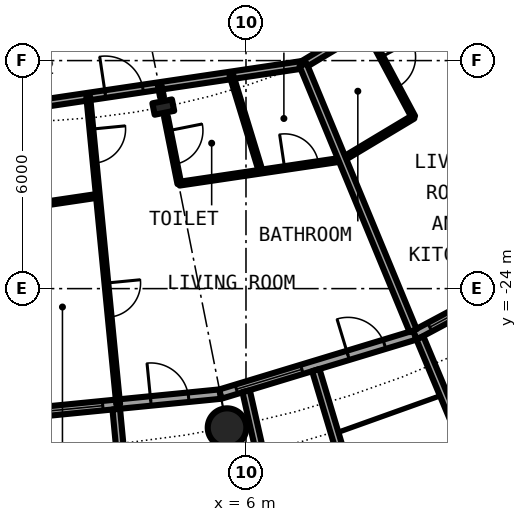
"""IFC4 building model, lengths in metres.
Left out: names, types, materials, properties, quantities, classifications, styles, units other than length and angle.
Written with IfcOpenShell. Run it as: python <this file> out.ifc"""

import sys

from ifc_helpers import new_model, si_unit, direction, frame, frame_2d, origin, origin_2d, place, context, subcontext, project, spatial, rectangle, hollow_circle, i_section, extrude, element, fill, save


model = new_model("IFC4")
c1 = context("Model", 3, precision=1e-05, world=origin(), true_north=direction((0.0, 1.0)))
c2 = subcontext(c1, "Body", "Model", "MODEL_VIEW")
j1 = project(units=[si_unit("LENGTHUNIT", "METRE"), si_unit("PLANEANGLEUNIT", "RADIAN")], contexts=[c1])
p1 = place(None, origin())
s1 = spatial("IfcSite", under=j1, at=p1, CompositionType="ELEMENT")
p2 = place(p1, origin())
s2 = spatial("IfcBuilding", under=s1, at=p2, CompositionType="ELEMENT")
p3 = place(p2, frame((0.0, 0.0, 75.8)))
s3 = spatial("IfcBuildingStorey", under=s2, at=p3, CompositionType="ELEMENT", Elevation=75.8)
p4 = place(p3, frame((5.501, -27.658, 0.0), z_axis=(0.0, 0.0, 1.0), x_axis=(1.0, 0.0, 0.0)))
e1 = element("IfcColumn", 1, at=p4, inside=s3, PredefinedType="COLUMN", context=c2, shape_type="SweptSolid", body=[
    extrude(hollow_circle(Radius=0.508, WallThickness=0.04, at=origin_2d()), origin(), (0.0, 0.0, 1.0), 3.05),
])
p5 = place(p3, frame((3.824, -19.223, 0.0), z_axis=(0.0, 0.0, 1.0), x_axis=(0.195090322016, -0.980785280403, 0.0)))
e2 = element("IfcColumn", 2, at=p5, inside=s3, PredefinedType="COLUMN", context=c2, shape_type="SweptSolid", body=[
    extrude(i_section(OverallWidth=0.306, OverallDepth=0.524, WebThickness=0.021, FlangeThickness=0.04, FilletRadius=0.027, at=origin_2d()), origin(), (0.0, 0.0, 1.0), 3.05),
])
p6 = place(p3, frame((0.0, -27.3, 0.0), z_axis=(0.0, 0.0, 1.0), x_axis=(0.995173996315, 0.098126026407, 0.0)))
e3 = element("IfcWall", 3, at=p6, inside=s3, PredefinedType="SOLIDWALL", context=c2, shape_type="SweptSolid", body=[
    extrude(rectangle(XDim=5.352, YDim=0.25, at=frame_2d((2.676, 0.0))), origin(), (0.0, 0.0, 1.0), 2.7),
])
p7 = place(p6, frame((0.441, 0.0, 0.3)))
e4 = element("IfcOpeningElement", 4, at=p7, cuts=e3, PredefinedType="OPENING", context=c2, shape_type="SweptSolid", body=[
    extrude(rectangle(XDim=1.8, YDim=2.1, at=frame_2d((0.9, 1.05))), frame((0.0, 0.135, 0.0), z_axis=(0.0, -1.0, 0.0), x_axis=(1.0, 0.0, 0.0)), (0.0, 0.0, 1.0), 0.27),
])
p8 = place(p6, frame((3.51, 0.0, 0.0)))
e5 = element("IfcOpeningElement", 5, at=p8, cuts=e3, PredefinedType="OPENING", context=c2, shape_type="SweptSolid", body=[
    extrude(rectangle(XDim=1.0, YDim=2.2, at=frame_2d((0.5, 1.1))), frame((0.0, 0.135, 0.0), z_axis=(0.0, -1.0, 0.0), x_axis=(1.0, 0.0, 0.0)), (0.0, 0.0, 1.0), 0.27),
])
p9 = place(p3, frame((2.586, -27.171, -0.03), z_axis=(0.0, 0.0, 1.0), x_axis=(0.094548432284, -0.995520262954, 0.0)))
e6 = element("IfcWall", 6, at=p9, inside=s3, PredefinedType="SOLIDWALL", context=c2, shape_type="SweptSolid", body=[
    extrude(rectangle(XDim=3.006, YDim=0.2, at=frame_2d((1.503, 0.0))), origin(), (0.0, 0.0, 1.0), 2.73),
])
p10 = place(p3, frame((5.326, -26.775, 0.0), z_axis=(0.0, 0.0, 1.0), x_axis=(0.956965678721, 0.290201119486, 0.0)))
e7 = element("IfcWall", 7, at=p10, inside=s3, PredefinedType="SOLIDWALL", context=c2, shape_type="SweptSolid", body=[
    extrude(rectangle(XDim=5.351, YDim=0.25, at=frame_2d((2.676, 0.0))), origin(), (0.0, 0.0, 1.0), 2.7),
])
p11 = place(p10, frame((0.441, 0.0, 0.3)))
e8 = element("IfcOpeningElement", 8, at=p11, cuts=e7, PredefinedType="OPENING", context=c2, shape_type="SweptSolid", body=[
    extrude(rectangle(XDim=1.8, YDim=2.1, at=frame_2d((0.9, 1.05))), frame((0.0, 0.135, 0.0), z_axis=(0.0, -1.0, 0.0), x_axis=(1.0, 0.0, 0.0)), (0.0, 0.0, 1.0), 0.27),
])
p12 = place(p10, frame((3.51, 0.0, 0.0)))
e9 = element("IfcOpeningElement", 9, at=p12, cuts=e7, PredefinedType="OPENING", context=c2, shape_type="SweptSolid", body=[
    extrude(rectangle(XDim=1.0, YDim=2.2, at=frame_2d((0.5, 1.1))), frame((0.0, 0.135, 0.0), z_axis=(0.0, -1.0, 0.0), x_axis=(1.0, 0.0, 0.0)), (0.0, 0.0, 1.0), 0.27),
])
p13 = place(p3, frame((6.004, -26.7, -0.03), z_axis=(0.0, 0.0, 1.0), x_axis=(0.219609259383, -0.975587911566, 0.0)))
e10 = element("IfcWall", 10, at=p13, inside=s3, PredefinedType="SOLIDWALL", context=c2, shape_type="SweptSolid", body=[
    extrude(rectangle(XDim=2.933, YDim=0.2, at=frame_2d((1.466, 0.0))), origin(), (0.0, 0.0, 1.0), 2.73),
])
p14 = place(p3, frame((7.837, -26.144, -0.03), z_axis=(0.0, 0.0, 1.0), x_axis=(0.287064767992, -0.957911174889, 0.0)))
e11 = element("IfcWall", 11, at=p14, inside=s3, PredefinedType="SOLIDWALL", context=c2, shape_type="SweptSolid", body=[
    extrude(rectangle(XDim=3.006, YDim=0.2, at=frame_2d((1.503, 0.0))), origin(), (0.0, 0.0, 1.0), 2.73),
])
p15 = place(p3, frame((10.447, -25.222, 0.0), z_axis=(0.0, 0.0, 1.0), x_axis=(0.881915646801, 0.471407246368, 0.0)))
e12 = element("IfcWall", 12, at=p15, inside=s3, PredefinedType="SOLIDWALL", context=c2, shape_type="SweptSolid", body=[
    extrude(rectangle(XDim=5.352, YDim=0.25, at=frame_2d((2.676, 0.0))), origin(), (0.0, 0.0, 1.0), 2.7),
])
p16 = place(p15, frame((0.441, 0.0, 0.3)))
e13 = element("IfcOpeningElement", 13, at=p16, cuts=e12, PredefinedType="OPENING", context=c2, shape_type="SweptSolid", body=[
    extrude(rectangle(XDim=1.8, YDim=2.1, at=frame_2d((0.9, 1.05))), frame((0.0, 0.135, 0.0), z_axis=(0.0, -1.0, 0.0), x_axis=(1.0, 0.0, 0.0)), (0.0, 0.0, 1.0), 0.27),
])
p17 = place(p15, frame((3.51, 0.0, 0.0)))
e14 = element("IfcOpeningElement", 14, at=p17, cuts=e12, PredefinedType="OPENING", context=c2, shape_type="SweptSolid", body=[
    extrude(rectangle(XDim=1.0, YDim=2.2, at=frame_2d((0.5, 1.1))), frame((0.0, 0.135, 0.0), z_axis=(0.0, -1.0, 0.0), x_axis=(1.0, 0.0, 0.0)), (0.0, 0.0, 1.0), 0.27),
])
p18 = place(p3, frame((10.575, -25.295, -0.03), z_axis=(0.0, 0.0, 1.0), x_axis=(0.385697364644, -0.922625353492, 0.0)))
e15 = element("IfcWall", 15, at=p18, inside=s3, PredefinedType="SOLIDWALL", context=c2, shape_type="SweptSolid", body=[
    extrude(rectangle(XDim=2.883, YDim=0.2, at=frame_2d((1.442, 0.0))), origin(), (0.0, 0.0, 1.0), 2.73),
])
p19 = place(p3, frame((8.534, -20.604, 0.0), z_axis=(0.0, 0.0, 1.0), x_axis=(0.857611386679, 0.514298268943, 0.0)))
e16 = element("IfcWall", 16, at=p19, inside=s3, PredefinedType="PARTITIONING", context=c2, shape_type="SweptSolid", body=[
    extrude(rectangle(XDim=2.182, YDim=0.1, at=frame_2d((1.091, 0.0))), origin(), (0.0, 0.0, 1.0), 2.7),
])
p20 = place(p3, frame((-2.186, -22.193, 0.0), z_axis=(0.0, 0.0, 1.0), x_axis=(0.989171386505, 0.146765009863, 0.0)))
e17 = element("IfcWall", 17, at=p20, inside=s3, PredefinedType="PARTITIONING", context=c2, shape_type="SweptSolid", body=[
    extrude(rectangle(XDim=4.335, YDim=0.1, at=frame_2d((2.167, 0.0))), origin(), (0.0, 0.0, 1.0), 2.7),
])
p21 = place(p3, frame((4.246, -21.239, 0.0), z_axis=(0.0, 0.0, 1.0), x_axis=(0.989178348771, 0.146718077695, 0.0)))
e18 = element("IfcWall", 18, at=p21, inside=s3, PredefinedType="PARTITIONING", context=c2, shape_type="SweptSolid", body=[
    extrude(rectangle(XDim=4.335, YDim=0.1, at=frame_2d((2.167, 0.0))), origin(), (0.0, 0.0, 1.0), 2.7),
])
p22 = place(p21, frame((2.801, 0.0, 0.0)))
e19 = element("IfcOpeningElement", 19, at=p22, cuts=e18, PredefinedType="OPENING", context=c2, shape_type="SweptSolid", body=[
    extrude(rectangle(XDim=0.9, YDim=2.3, at=frame_2d((0.45, 1.15))), frame((0.0, 0.06, 0.0), z_axis=(0.0, -1.0, 0.0), x_axis=(1.0, 0.0, 0.0)), (0.0, 0.0, 1.0), 0.12),
])
p23 = place(p3, frame((7.495, -18.111, 0.0), z_axis=(0.0, 0.0, 1.0), x_axis=(0.857697633371, 0.514154422046, 0.0)))
e20 = element("IfcWall", 20, at=p23, inside=s3, PredefinedType="PARTITIONING", context=c2, shape_type="SweptSolid", body=[
    extrude(rectangle(XDim=3.682, YDim=0.2, at=frame_2d((1.841, 0.0))), origin(), (0.0, 0.0, 1.0), 2.38),
])
p24 = place(p23, frame((2.224, 0.0, 0.0)))
e21 = element("IfcOpeningElement", 21, at=p24, cuts=e20, PredefinedType="OPENING", context=c2, shape_type="SweptSolid", body=[
    extrude(rectangle(XDim=1.0, YDim=2.3, at=frame_2d((0.5, 1.15))), frame((0.0, 0.11, 0.0), z_axis=(0.0, -1.0, 0.0), x_axis=(1.0, 0.0, 0.0)), (0.0, 0.0, 1.0), 0.22),
])
p25 = place(p3, frame((-1.918, -19.507, 0.0), z_axis=(0.0, 0.0, 1.0), x_axis=(0.989144916871, 0.146943300045, 0.0)))
e22 = element("IfcWall", 22, at=p25, inside=s3, PredefinedType="PARTITIONING", context=c2, shape_type="SweptSolid", body=[
    extrude(rectangle(XDim=9.529, YDim=0.2, at=frame_2d((4.764, 0.0))), origin(), (0.0, 0.0, 1.0), 2.38),
])
p26 = place(p25, frame((4.261, 0.0, 0.0)))
e23 = element("IfcOpeningElement", 23, at=p26, cuts=e22, PredefinedType="OPENING", context=c2, shape_type="SweptSolid", body=[
    extrude(rectangle(XDim=1.0, YDim=2.3, at=frame_2d((0.5, 1.15))), frame((0.0, 0.11, 0.0), z_axis=(0.0, -1.0, 0.0), x_axis=(1.0, 0.0, 0.0)), (0.0, 0.0, 1.0), 0.22),
])
p27 = place(p3, frame((1.848, -18.947, 0.0), z_axis=(0.0, 0.0, 1.0), x_axis=(0.09695500902, -0.995288765246, 0.0)))
e24 = element("IfcWall", 24, at=p27, inside=s3, PredefinedType="PARTITIONING", context=c2, shape_type="SweptSolid", body=[
    extrude(rectangle(XDim=8.138, YDim=0.1, at=frame_2d((4.069, 0.0))), origin(), (0.0, 0.0, 1.0), 2.7),
])
p28 = place(p27, frame((0.861, 0.0, 0.0)))
e25 = element("IfcOpeningElement", 25, at=p28, cuts=e24, PredefinedType="OPENING", context=c2, shape_type="SweptSolid", body=[
    extrude(rectangle(XDim=0.9, YDim=2.3, at=frame_2d((0.45, 1.15))), frame((0.0, 0.06, 0.0), z_axis=(0.0, -1.0, 0.0), x_axis=(1.0, 0.0, 0.0)), (0.0, 0.0, 1.0), 0.12),
])
p29 = place(p27, frame((4.93, 0.0, 0.0)))
e26 = element("IfcOpeningElement", 26, at=p29, cuts=e24, PredefinedType="OPENING", context=c2, shape_type="SweptSolid", body=[
    extrude(rectangle(XDim=0.9, YDim=2.3, at=frame_2d((0.45, 1.15))), frame((0.0, 0.06, 0.0), z_axis=(0.0, -1.0, 0.0), x_axis=(1.0, 0.0, 0.0)), (0.0, 0.0, 1.0), 0.12),
])
p30 = place(p3, frame((3.732, -18.667, 0.0), z_axis=(0.0, 0.0, 1.0), x_axis=(0.195804928618, -0.980642865639, 0.0)))
e27 = element("IfcWall", 27, at=p30, inside=s3, PredefinedType="PARTITIONING", context=c2, shape_type="SweptSolid", body=[
    extrude(rectangle(XDim=0.302, YDim=0.1, at=frame_2d((0.151, 0.0))), origin(), (0.0, 0.0, 1.0), 2.7),
])
p31 = place(p3, frame((3.894, -19.477, 0.0), z_axis=(0.0, 0.0, 1.0), x_axis=(0.195933221699, -0.980617240637, 0.0)))
e28 = element("IfcWall", 28, at=p31, inside=s3, PredefinedType="PARTITIONING", context=c2, shape_type="SweptSolid", body=[
    extrude(rectangle(XDim=1.797, YDim=0.1, at=frame_2d((0.898, 0.0))), origin(), (0.0, 0.0, 1.0), 2.7),
])
p32 = place(p31, frame((0.374, 0.0, 0.0)))
e29 = element("IfcOpeningElement", 29, at=p32, cuts=e28, PredefinedType="OPENING", context=c2, shape_type="SweptSolid", body=[
    extrude(rectangle(XDim=0.9, YDim=2.3, at=frame_2d((0.45, 1.15))), frame((0.0, 0.06, 0.0), z_axis=(0.0, -1.0, 0.0), x_axis=(1.0, 0.0, 0.0)), (0.0, 0.0, 1.0), 0.12),
])
p33 = place(p3, frame((5.616, -18.388, 0.0), z_axis=(0.0, 0.0, 1.0), x_axis=(0.292206826201, -0.956355148845, 0.0)))
e30 = element("IfcWall", 30, at=p33, inside=s3, PredefinedType="PARTITIONING", context=c2, shape_type="SweptSolid", body=[
    extrude(rectangle(XDim=2.648, YDim=0.1, at=frame_2d((1.324, 0.0))), origin(), (0.0, 0.0, 1.0), 2.7),
])
p34 = place(p3, frame((7.501, -18.108, 0.0), z_axis=(0.0, 0.0, 1.0), x_axis=(0.382600411313, -0.923913916587, 0.0)))
e31 = element("IfcWall", 31, at=p34, inside=s3, PredefinedType="PARTITIONING", context=c2, shape_type="SweptSolid", body=[
    extrude(rectangle(XDim=7.574, YDim=0.2, at=frame_2d((3.787, 0.0))), origin(), (0.0, 0.0, 1.0), 2.7),
])
p35 = place(p3, frame((9.145, -17.122, 0.0), z_axis=(0.0, 0.0, 1.0), x_axis=(0.471151994359, -0.882052038267, 0.0)))
e32 = element("IfcWall", 32, at=p35, inside=s3, PredefinedType="PARTITIONING", context=c2, shape_type="SweptSolid", body=[
    extrude(rectangle(XDim=2.674, YDim=0.1, at=frame_2d((1.337, 0.0))), origin(), (0.0, 0.0, 1.0), 2.7),
])
p36 = place(p35, frame((0.887, 0.0, 0.0)))
e33 = element("IfcOpeningElement", 33, at=p36, cuts=e32, PredefinedType="OPENING", context=c2, shape_type="SweptSolid", body=[
    extrude(rectangle(XDim=0.9, YDim=2.3, at=frame_2d((0.45, 1.15))), frame((0.0, 0.06, 0.0), z_axis=(0.0, -1.0, 0.0), x_axis=(1.0, 0.0, 0.0)), (0.0, 0.0, 1.0), 0.12),
])
p37 = place(p7, origin())
e34 = element("IfcWindow", 34, at=p37, inside=s3, PartitioningType="SINGLE_PANEL", PredefinedType="WINDOW", context=c2, shape_type="SweptSolid", body=[
    extrude(rectangle(XDim=1.8, YDim=2.1, at=frame_2d((0.9, 1.05))), frame((0.0, 0.03, 0.0), z_axis=(0.0, -1.0, 0.0), x_axis=(1.0, 0.0, 0.0)), (0.0, 0.0, 1.0), 0.06),
])
fill(e4, e34)
p38 = place(p8, origin())
e35 = element("IfcDoor", 35, at=p38, inside=s3, OperationType="SINGLE_SWING_LEFT", PredefinedType="DOOR", context=c2, shape_type="SweptSolid", body=[
    extrude(rectangle(XDim=1.0, YDim=2.2, at=frame_2d((0.5, 1.1))), frame((0.0, 0.025, 0.0), z_axis=(0.0, -1.0, 0.0), x_axis=(1.0, 0.0, 0.0)), (0.0, 0.0, 1.0), 0.05),
])
fill(e5, e35)
p39 = place(p11, origin())
e36 = element("IfcWindow", 36, at=p39, inside=s3, PartitioningType="SINGLE_PANEL", PredefinedType="WINDOW", context=c2, shape_type="SweptSolid", body=[
    extrude(rectangle(XDim=1.8, YDim=2.1, at=frame_2d((0.9, 1.05))), frame((0.0, 0.03, 0.0), z_axis=(0.0, -1.0, 0.0), x_axis=(1.0, 0.0, 0.0)), (0.0, 0.0, 1.0), 0.06),
])
fill(e8, e36)
p40 = place(p12, origin())
e37 = element("IfcDoor", 37, at=p40, inside=s3, OperationType="SINGLE_SWING_LEFT", PredefinedType="DOOR", context=c2, shape_type="SweptSolid", body=[
    extrude(rectangle(XDim=1.0, YDim=2.2, at=frame_2d((0.5, 1.1))), frame((0.0, 0.025, 0.0), z_axis=(0.0, -1.0, 0.0), x_axis=(1.0, 0.0, 0.0)), (0.0, 0.0, 1.0), 0.05),
])
fill(e9, e37)
p41 = place(p16, origin())
e38 = element("IfcWindow", 38, at=p41, inside=s3, PartitioningType="SINGLE_PANEL", PredefinedType="WINDOW", context=c2, shape_type="SweptSolid", body=[
    extrude(rectangle(XDim=1.8, YDim=2.1, at=frame_2d((0.9, 1.05))), frame((0.0, 0.03, 0.0), z_axis=(0.0, -1.0, 0.0), x_axis=(1.0, 0.0, 0.0)), (0.0, 0.0, 1.0), 0.06),
])
fill(e13, e38)
p42 = place(p26, origin())
e39 = element("IfcDoor", 39, at=p42, inside=s3, OperationType="SINGLE_SWING_LEFT", PredefinedType="DOOR", context=c2, shape_type="SweptSolid", body=[
    extrude(rectangle(XDim=1.0, YDim=2.3, at=frame_2d((0.5, 1.15))), frame((0.0, 0.025, 0.0), z_axis=(0.0, -1.0, 0.0), x_axis=(1.0, 0.0, 0.0)), (0.0, 0.0, 1.0), 0.05),
])
fill(e23, e39)
p43 = place(p22, origin())
e40 = element("IfcDoor", 40, at=p43, inside=s3, OperationType="SINGLE_SWING_RIGHT", PredefinedType="DOOR", context=c2, shape_type="SweptSolid", body=[
    extrude(rectangle(XDim=0.9, YDim=2.3, at=frame_2d((0.45, 1.15))), frame((0.0, 0.025, 0.0), z_axis=(0.0, -1.0, 0.0), x_axis=(1.0, 0.0, 0.0)), (0.0, 0.0, 1.0), 0.05),
])
fill(e19, e40)
p44 = place(p32, origin())
e41 = element("IfcDoor", 41, at=p44, inside=s3, OperationType="SINGLE_SWING_LEFT", PredefinedType="DOOR", context=c2, shape_type="SweptSolid", body=[
    extrude(rectangle(XDim=0.9, YDim=2.3, at=frame_2d((0.45, 1.15))), frame((0.0, 0.025, 0.0), z_axis=(0.0, -1.0, 0.0), x_axis=(1.0, 0.0, 0.0)), (0.0, 0.0, 1.0), 0.05),
])
fill(e29, e41)
p45 = place(p28, origin())
e42 = element("IfcDoor", 42, at=p45, inside=s3, OperationType="SINGLE_SWING_LEFT", PredefinedType="DOOR", context=c2, shape_type="SweptSolid", body=[
    extrude(rectangle(XDim=0.9, YDim=2.3, at=frame_2d((0.45, 1.15))), frame((0.0, 0.025, 0.0), z_axis=(0.0, -1.0, 0.0), x_axis=(1.0, 0.0, 0.0)), (0.0, 0.0, 1.0), 0.05),
])
fill(e25, e42)
p46 = place(p29, origin())
e43 = element("IfcDoor", 43, at=p46, inside=s3, OperationType="SINGLE_SWING_RIGHT", PredefinedType="DOOR", context=c2, shape_type="SweptSolid", body=[
    extrude(rectangle(XDim=0.9, YDim=2.3, at=frame_2d((0.45, 1.15))), frame((0.0, 0.025, 0.0), z_axis=(0.0, -1.0, 0.0), x_axis=(1.0, 0.0, 0.0)), (0.0, 0.0, 1.0), 0.05),
])
fill(e26, e43)
p47 = place(p36, origin())
e44 = element("IfcDoor", 44, at=p47, inside=s3, OperationType="SINGLE_SWING_RIGHT", PredefinedType="DOOR", context=c2, shape_type="SweptSolid", body=[
    extrude(rectangle(XDim=0.9, YDim=2.3, at=frame_2d((0.45, 1.15))), frame((0.0, 0.025, 0.0), z_axis=(0.0, -1.0, 0.0), x_axis=(1.0, 0.0, 0.0)), (0.0, 0.0, 1.0), 0.05),
])
fill(e33, e44)
save(model, sys.argv[1])
